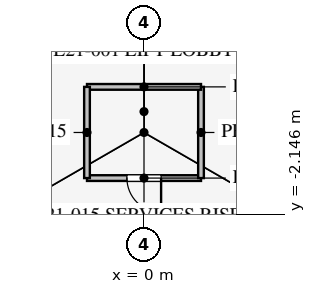
"""IFC4 building model, lengths in metres.
Left out: names, types, materials, properties, quantities, classifications, styles, units other than length and angle.
Written with IfcOpenShell. Run it as: python <this file> out.ifc"""

import sys

from ifc_helpers import new_model, si_unit, direction, frame, frame_2d, origin, place, context, subcontext, project, spatial, rectangle, extrude, element, fill, save


model = new_model("IFC4")
c1 = context("Model", 3, precision=1e-05, world=origin(), true_north=direction((0.0, 1.0)))
c2 = subcontext(c1, "Body", "Model", "MODEL_VIEW")
j1 = project(units=[si_unit("LENGTHUNIT", "METRE"), si_unit("PLANEANGLEUNIT", "RADIAN")], contexts=[c1])
p1 = place(None, origin())
s1 = spatial("IfcSite", under=j1, at=p1, CompositionType="ELEMENT")
p2 = place(p1, origin())
s2 = spatial("IfcBuilding", under=s1, at=p2, CompositionType="ELEMENT")
p3 = place(p2, frame((0.0, 0.0, 92.1)))
s3 = spatial("IfcBuildingStorey", under=s2, at=p3, CompositionType="ELEMENT", Elevation=92.1)
p4 = place(p3, frame((-1.5, -1.2, 0.0), z_axis=(0.0, 0.0, 1.0), x_axis=(1.0, 0.0, 0.0)))
e1 = element("IfcWall", 1, at=p4, inside=s3, PredefinedType="PARTITIONING", context=c2, shape_type="SweptSolid", body=[
    extrude(rectangle(XDim=3.0, YDim=0.15, at=frame_2d((1.5, 0.0))), origin(), (0.0, 0.0, 1.0), 5.8),
])
p5 = place(p4, frame((1.05, 0.0, 0.0)))
e2 = element("IfcOpeningElement", 2, at=p5, cuts=e1, PredefinedType="OPENING", context=c2, shape_type="SweptSolid", body=[
    extrude(rectangle(XDim=0.9, YDim=2.1, at=frame_2d((0.45, 1.05))), frame((0.0, 0.085, 0.0), z_axis=(0.0, -1.0, 0.0), x_axis=(1.0, 0.0, 0.0)), (0.0, 0.0, 1.0), 0.17),
])
p6 = place(p3, frame((1.5, -1.2, 0.0), z_axis=(0.0, 0.0, 1.0), x_axis=(0.0, 1.0, 0.0)))
e3 = element("IfcWall", 3, at=p6, inside=s3, PredefinedType="PARTITIONING", context=c2, shape_type="SweptSolid", body=[
    extrude(rectangle(XDim=2.4, YDim=0.15, at=frame_2d((1.2, 0.0))), origin(), (0.0, 0.0, 1.0), 5.8),
])
p7 = place(p3, frame((1.5, 1.2, 0.0), z_axis=(0.0, 0.0, 1.0), x_axis=(-1.0, 0.0, 0.0)))
e4 = element("IfcWall", 4, at=p7, inside=s3, PredefinedType="PARTITIONING", context=c2, shape_type="SweptSolid", body=[
    extrude(rectangle(XDim=3.0, YDim=0.15, at=frame_2d((1.5, 0.0))), origin(), (0.0, 0.0, 1.0), 5.8),
])
p8 = place(p3, frame((-1.5, 1.2, 0.0), z_axis=(0.0, 0.0, 1.0), x_axis=(0.0, -1.0, 0.0)))
e5 = element("IfcWall", 5, at=p8, inside=s3, PredefinedType="PARTITIONING", context=c2, shape_type="SweptSolid", body=[
    extrude(rectangle(XDim=2.4, YDim=0.15, at=frame_2d((1.2, 0.0))), origin(), (0.0, 0.0, 1.0), 5.8),
])
p9 = place(p5, frame((0.9, 0.0, 0.0), z_axis=(0.0, 0.0, 1.0), x_axis=(-1.0, 0.0, 0.0)))
e6 = element("IfcDoor", 6, at=p9, inside=s3, OperationType="SINGLE_SWING_LEFT", PredefinedType="DOOR", context=c2, shape_type="SweptSolid", body=[
    extrude(rectangle(XDim=0.9, YDim=2.1, at=frame_2d((0.45, 1.05))), frame((0.0, 0.025, 0.0), z_axis=(0.0, -1.0, 0.0), x_axis=(1.0, 0.0, 0.0)), (0.0, 0.0, 1.0), 0.05),
])
fill(e2, e6)
save(model, sys.argv[1])
